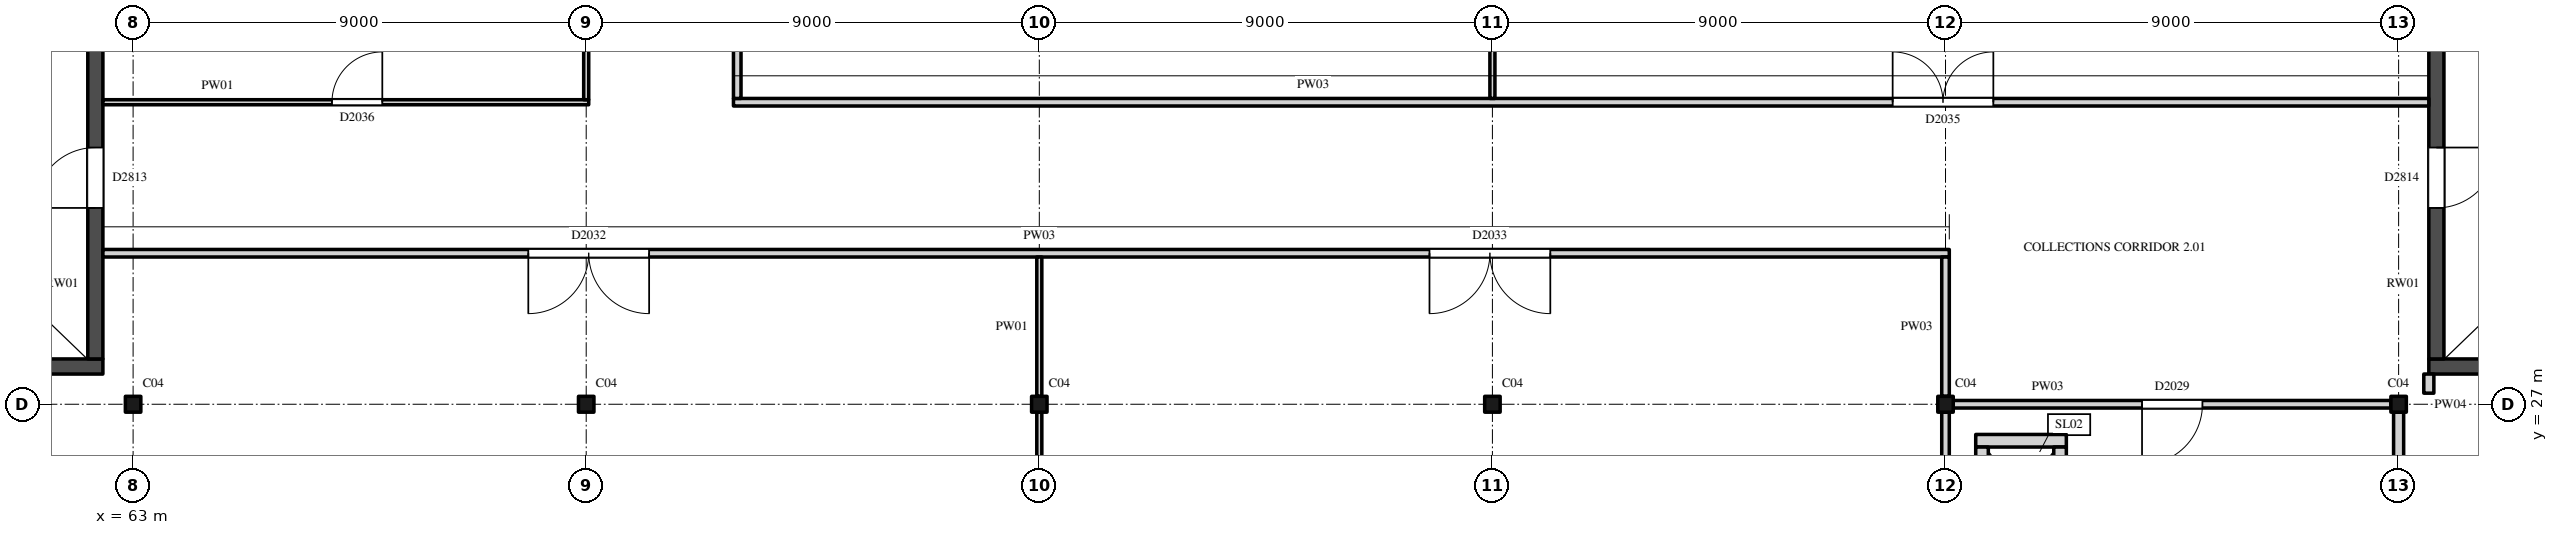
"""IFC4 building model, lengths in metres.
Left out: names, types, materials, properties, quantities, classifications, styles, units other than length and angle.
Written with IfcOpenShell. Run it as: python <this file> out.ifc"""

import sys

from ifc_helpers import new_model, si_unit, direction, frame, frame_2d, origin, origin_2d, place, context, subcontext, project, spatial, rectangle, i_section, extrude, element, fill, save


model = new_model("IFC4")
c1 = context("Model", 3, precision=1e-05, world=origin(), true_north=direction((0.0, 1.0)))
c2 = subcontext(c1, "Body", "Model", "MODEL_VIEW")
j1 = project(units=[si_unit("LENGTHUNIT", "METRE"), si_unit("PLANEANGLEUNIT", "RADIAN")], contexts=[c1])
p1 = place(None, origin())
s1 = spatial("IfcSite", under=j1, at=p1, CompositionType="ELEMENT")
p2 = place(p1, origin())
s2 = spatial("IfcBuilding", under=s1, at=p2, CompositionType="ELEMENT")
p3 = place(p2, frame((0.0, 0.0, 11.0)))
s3 = spatial("IfcBuildingStorey", under=s2, at=p3, CompositionType="ELEMENT", Elevation=11.0)
for number, where, z_axis, x_axis in (
    (1, (63.0, 27.0, 0.0), (0.0, 0.0, 1.0), (1.0, 0.0, 0.0)),
    (2, (72.0, 27.0, 0.0), (0.0, 0.0, 1.0), (1.0, 0.0, 0.0)),
    (3, (81.0, 27.0, 0.0), (0.0, 0.0, 1.0), (1.0, 0.0, 0.0)),
    (4, (90.0, 27.0, 0.0), (0.0, 0.0, 1.0), (1.0, 0.0, 0.0)),
    (5, (99.0, 27.0, 0.0), (0.0, 0.0, 1.0), (1.0, 0.0, 0.0)),
    (6, (108.0, 27.0, 0.0), (0.0, 0.0, 1.0), (1.0, 0.0, 0.0)),
):
    element("IfcColumn", number, at=place(p3, frame(where, z_axis=z_axis, x_axis=x_axis)), inside=s3, PredefinedType="COLUMN", context=c2, shape_type="SweptSolid", body=[
        extrude(i_section(OverallWidth=0.307, OverallDepth=0.315, WebThickness=0.012, FlangeThickness=0.019, FilletRadius=0.017, at=origin_2d()), origin(), (0.0, 0.0, 1.0), 5.0),
    ])
p4 = place(p3, frame((54.3, 27.75, 0.0), z_axis=(0.0, 0.0, 1.0), x_axis=(1.0, 0.0, 0.0)))
e7 = element("IfcWall", 7, at=p4, inside=s3, PredefinedType="SHEAR", context=c2, shape_type="SweptSolid", body=[
    extrude(rectangle(XDim=8.1, YDim=0.3, at=frame_2d((4.05, 0.0))), origin(), (0.0, 0.0, 1.0), 4.825),
])
p5 = place(p3, frame((62.25, 27.9, 0.0), z_axis=(0.0, 0.0, 1.0), x_axis=(0.0, 1.0, 0.0)))
e8 = element("IfcWall", 8, at=p5, inside=s3, PredefinedType="SHEAR", context=c2, shape_type="SweptSolid", body=[
    extrude(rectangle(XDim=7.2, YDim=0.3, at=frame_2d((3.6, 0.0))), origin(), (0.0, 0.0, 1.0), 4.825),
])
p6 = place(p5, frame((3.0, 0.0, 0.0)))
e9 = element("IfcOpeningElement", 9, at=p6, cuts=e8, PredefinedType="OPENING", context=c2, shape_type="SweptSolid", body=[
    extrude(rectangle(XDim=1.2, YDim=2.1, at=frame_2d((0.6, 1.05))), frame((0.0, 0.16, 0.0), z_axis=(0.0, -1.0, 0.0), x_axis=(1.0, 0.0, 0.0)), (0.0, 0.0, 1.0), 0.32),
])
p7 = place(p3, frame((108.6, 27.75, 0.0), z_axis=(0.0, 0.0, 1.0), x_axis=(1.0, 0.0, 0.0)))
e10 = element("IfcWall", 10, at=p7, inside=s3, PredefinedType="SHEAR", context=c2, shape_type="SweptSolid", body=[
    extrude(rectangle(XDim=8.1, YDim=0.3, at=frame_2d((4.05, 0.0))), origin(), (0.0, 0.0, 1.0), 4.825),
])
p8 = place(p3, frame((108.75, 27.9, 0.0), z_axis=(0.0, 0.0, 1.0), x_axis=(0.0, 1.0, 0.0)))
e11 = element("IfcWall", 11, at=p8, inside=s3, PredefinedType="SHEAR", context=c2, shape_type="SweptSolid", body=[
    extrude(rectangle(XDim=7.2, YDim=0.3, at=frame_2d((3.6, 0.0))), origin(), (0.0, 0.0, 1.0), 4.825),
])
p9 = place(p8, frame((3.0, 0.0, 0.0)))
e12 = element("IfcOpeningElement", 12, at=p9, cuts=e11, PredefinedType="OPENING", context=c2, shape_type="SweptSolid", body=[
    extrude(rectangle(XDim=1.2, YDim=2.1, at=frame_2d((0.6, 1.05))), frame((0.0, 0.16, 0.0), z_axis=(0.0, -1.0, 0.0), x_axis=(1.0, 0.0, 0.0)), (0.0, 0.0, 1.0), 0.32),
])
p10 = place(p3, frame((99.6, 26.275, 0.0), z_axis=(0.0, 0.0, 1.0), x_axis=(1.0, 0.0, 0.0)))
e13 = element("IfcWall", 13, at=p10, inside=s3, PredefinedType="STANDARD", context=c2, shape_type="SweptSolid", body=[
    extrude(rectangle(XDim=1.8, YDim=0.25, at=frame_2d((0.9, 0.0))), origin(), (0.0, 0.0, 1.0), 4.825),
])
p11 = place(p3, frame((99.725, 24.25, 0.0), z_axis=(0.0, 0.0, 1.0), x_axis=(0.0, 1.0, 0.0)))
e14 = element("IfcWall", 14, at=p11, inside=s3, PredefinedType="STANDARD", context=c2, shape_type="SweptSolid", body=[
    extrude(rectangle(XDim=1.9, YDim=0.25, at=frame_2d((0.95, 0.0))), origin(), (0.0, 0.0, 1.0), 4.825),
])
p12 = place(p3, frame((101.275, 24.25, 0.0), z_axis=(0.0, 0.0, 1.0), x_axis=(0.0, 1.0, 0.0)))
e15 = element("IfcWall", 15, at=p12, inside=s3, PredefinedType="STANDARD", context=c2, shape_type="SweptSolid", body=[
    extrude(rectangle(XDim=1.9, YDim=0.25, at=frame_2d((0.95, 0.0))), origin(), (0.0, 0.0, 1.0), 4.825),
])
p13 = place(p12, frame((0.5, 0.0, 0.0)))
e16 = element("IfcOpeningElement", 16, at=p13, cuts=e15, PredefinedType="OPENING", context=c2, shape_type="SweptSolid", body=[
    extrude(rectangle(XDim=0.9, YDim=2.1, at=frame_2d((0.45, 1.05))), frame((0.0, 0.135, 0.0), z_axis=(0.0, -1.0, 0.0), x_axis=(1.0, 0.0, 0.0)), (0.0, 0.0, 1.0), 0.27),
])
for number, where, z_axis, x_axis in (
    (17, (55.5, 29.325, 5.0), (0.0, 0.0, 1.0), (1.0, 0.0, 0.0)),
    (18, (55.5, 33.675, 5.0), (0.0, 0.0, 1.0), (1.0, 0.0, 0.0)),
):
    element("IfcWall", number, at=place(p3, frame(where, z_axis=z_axis, x_axis=x_axis)), inside=s3, PredefinedType="PARAPET", context=c2, shape_type="SweptSolid", body=[
        extrude(rectangle(XDim=6.0, YDim=0.15, at=frame_2d((3.0, 0.0))), origin(), (0.0, 0.0, 1.0), 0.5),
    ])
p14 = place(p3, frame((61.425, 29.4, 5.0), z_axis=(0.0, 0.0, 1.0), x_axis=(0.0, 1.0, 0.0)))
e19 = element("IfcWall", 19, at=p14, inside=s3, PredefinedType="PARAPET", context=c2, shape_type="SweptSolid", body=[
    extrude(rectangle(XDim=4.2, YDim=0.15, at=frame_2d((2.1, 0.0))), origin(), (0.0, 0.0, 1.0), 0.5),
])
for number, where, z_axis, x_axis in (
    (20, (64.5, 29.325, 5.0), (0.0, 0.0, 1.0), (1.0, 0.0, 0.0)),
    (21, (64.5, 33.675, 5.0), (0.0, 0.0, 1.0), (1.0, 0.0, 0.0)),
):
    element("IfcWall", number, at=place(p3, frame(where, z_axis=z_axis, x_axis=x_axis)), inside=s3, PredefinedType="PARAPET", context=c2, shape_type="SweptSolid", body=[
        extrude(rectangle(XDim=6.0, YDim=0.15, at=frame_2d((3.0, 0.0))), origin(), (0.0, 0.0, 1.0), 0.5),
    ])
for number, where, z_axis, x_axis in (
    (22, (64.575, 29.4, 5.0), (0.0, 0.0, 1.0), (0.0, 1.0, 0.0)),
    (23, (70.425, 29.4, 5.0), (0.0, 0.0, 1.0), (0.0, 1.0, 0.0)),
):
    element("IfcWall", number, at=place(p3, frame(where, z_axis=z_axis, x_axis=x_axis)), inside=s3, PredefinedType="PARAPET", context=c2, shape_type="SweptSolid", body=[
        extrude(rectangle(XDim=4.2, YDim=0.15, at=frame_2d((2.1, 0.0))), origin(), (0.0, 0.0, 1.0), 0.5),
    ])
for number, where, z_axis, x_axis in (
    (24, (73.5, 29.325, 5.0), (0.0, 0.0, 1.0), (1.0, 0.0, 0.0)),
    (25, (73.5, 33.675, 5.0), (0.0, 0.0, 1.0), (1.0, 0.0, 0.0)),
):
    element("IfcWall", number, at=place(p3, frame(where, z_axis=z_axis, x_axis=x_axis)), inside=s3, PredefinedType="PARAPET", context=c2, shape_type="SweptSolid", body=[
        extrude(rectangle(XDim=6.0, YDim=0.15, at=frame_2d((3.0, 0.0))), origin(), (0.0, 0.0, 1.0), 0.5),
    ])
for number, where, z_axis, x_axis in (
    (26, (73.575, 29.4, 5.0), (0.0, 0.0, 1.0), (0.0, 1.0, 0.0)),
    (27, (79.425, 29.4, 5.0), (0.0, 0.0, 1.0), (0.0, 1.0, 0.0)),
):
    element("IfcWall", number, at=place(p3, frame(where, z_axis=z_axis, x_axis=x_axis)), inside=s3, PredefinedType="PARAPET", context=c2, shape_type="SweptSolid", body=[
        extrude(rectangle(XDim=4.2, YDim=0.15, at=frame_2d((2.1, 0.0))), origin(), (0.0, 0.0, 1.0), 0.5),
    ])
for number, where, z_axis, x_axis in (
    (28, (82.5, 29.325, 5.0), (0.0, 0.0, 1.0), (1.0, 0.0, 0.0)),
    (29, (82.5, 33.675, 5.0), (0.0, 0.0, 1.0), (1.0, 0.0, 0.0)),
):
    element("IfcWall", number, at=place(p3, frame(where, z_axis=z_axis, x_axis=x_axis)), inside=s3, PredefinedType="PARAPET", context=c2, shape_type="SweptSolid", body=[
        extrude(rectangle(XDim=6.0, YDim=0.15, at=frame_2d((3.0, 0.0))), origin(), (0.0, 0.0, 1.0), 0.5),
    ])
for number, where, z_axis, x_axis in (
    (30, (82.575, 29.4, 5.0), (0.0, 0.0, 1.0), (0.0, 1.0, 0.0)),
    (31, (88.425, 29.4, 5.0), (0.0, 0.0, 1.0), (0.0, 1.0, 0.0)),
):
    element("IfcWall", number, at=place(p3, frame(where, z_axis=z_axis, x_axis=x_axis)), inside=s3, PredefinedType="PARAPET", context=c2, shape_type="SweptSolid", body=[
        extrude(rectangle(XDim=4.2, YDim=0.15, at=frame_2d((2.1, 0.0))), origin(), (0.0, 0.0, 1.0), 0.5),
    ])
for number, where, z_axis, x_axis in (
    (32, (91.5, 29.325, 5.0), (0.0, 0.0, 1.0), (1.0, 0.0, 0.0)),
    (33, (91.5, 33.675, 5.0), (0.0, 0.0, 1.0), (1.0, 0.0, 0.0)),
):
    element("IfcWall", number, at=place(p3, frame(where, z_axis=z_axis, x_axis=x_axis)), inside=s3, PredefinedType="PARAPET", context=c2, shape_type="SweptSolid", body=[
        extrude(rectangle(XDim=6.0, YDim=0.15, at=frame_2d((3.0, 0.0))), origin(), (0.0, 0.0, 1.0), 0.5),
    ])
for number, where, z_axis, x_axis in (
    (34, (91.575, 29.4, 5.0), (0.0, 0.0, 1.0), (0.0, 1.0, 0.0)),
    (35, (97.425, 29.4, 5.0), (0.0, 0.0, 1.0), (0.0, 1.0, 0.0)),
):
    element("IfcWall", number, at=place(p3, frame(where, z_axis=z_axis, x_axis=x_axis)), inside=s3, PredefinedType="PARAPET", context=c2, shape_type="SweptSolid", body=[
        extrude(rectangle(XDim=4.2, YDim=0.15, at=frame_2d((2.1, 0.0))), origin(), (0.0, 0.0, 1.0), 0.5),
    ])
for number, where, z_axis, x_axis in (
    (36, (100.5, 29.325, 5.0), (0.0, 0.0, 1.0), (1.0, 0.0, 0.0)),
    (37, (100.5, 33.675, 5.0), (0.0, 0.0, 1.0), (1.0, 0.0, 0.0)),
):
    element("IfcWall", number, at=place(p3, frame(where, z_axis=z_axis, x_axis=x_axis)), inside=s3, PredefinedType="PARAPET", context=c2, shape_type="SweptSolid", body=[
        extrude(rectangle(XDim=6.0, YDim=0.15, at=frame_2d((3.0, 0.0))), origin(), (0.0, 0.0, 1.0), 0.5),
    ])
for number, where, z_axis, x_axis in (
    (38, (100.575, 29.4, 5.0), (0.0, 0.0, 1.0), (0.0, 1.0, 0.0)),
    (39, (106.425, 29.4, 5.0), (0.0, 0.0, 1.0), (0.0, 1.0, 0.0)),
):
    element("IfcWall", number, at=place(p3, frame(where, z_axis=z_axis, x_axis=x_axis)), inside=s3, PredefinedType="PARAPET", context=c2, shape_type="SweptSolid", body=[
        extrude(rectangle(XDim=4.2, YDim=0.15, at=frame_2d((2.1, 0.0))), origin(), (0.0, 0.0, 1.0), 0.5),
    ])
for number, where, z_axis, x_axis in (
    (40, (109.5, 29.325, 5.0), (0.0, 0.0, 1.0), (1.0, 0.0, 0.0)),
    (41, (109.5, 33.675, 5.0), (0.0, 0.0, 1.0), (1.0, 0.0, 0.0)),
):
    element("IfcWall", number, at=place(p3, frame(where, z_axis=z_axis, x_axis=x_axis)), inside=s3, PredefinedType="PARAPET", context=c2, shape_type="SweptSolid", body=[
        extrude(rectangle(XDim=6.0, YDim=0.15, at=frame_2d((3.0, 0.0))), origin(), (0.0, 0.0, 1.0), 0.5),
    ])
p15 = place(p3, frame((109.575, 29.4, 5.0), z_axis=(0.0, 0.0, 1.0), x_axis=(0.0, 1.0, 0.0)))
e42 = element("IfcWall", 42, at=p15, inside=s3, PredefinedType="PARAPET", context=c2, shape_type="SweptSolid", body=[
    extrude(rectangle(XDim=4.2, YDim=0.15, at=frame_2d((2.1, 0.0))), origin(), (0.0, 0.0, 1.0), 0.5),
])
p16 = place(p3, frame((99.154, 27.0, 0.0), z_axis=(0.0, 0.0, 1.0), x_axis=(1.0, 0.0, 0.0)))
e43 = element("IfcWall", 43, at=p16, inside=s3, PredefinedType="PARTITIONING", context=c2, shape_type="SweptSolid", body=[
    extrude(rectangle(XDim=8.693, YDim=0.15, at=frame_2d((4.346, 0.0))), origin(), (0.0, 0.0, 1.0), 4.419),
])
p17 = place(p16, frame((3.75, 0.0, 0.0)))
e44 = element("IfcOpeningElement", 44, at=p17, cuts=e43, PredefinedType="OPENING", context=c2, shape_type="SweptSolid", body=[
    extrude(rectangle(XDim=1.2, YDim=2.4, at=frame_2d((0.6, 1.2))), frame((0.0, 0.085, 0.0), z_axis=(0.0, -1.0, 0.0), x_axis=(1.0, 0.0, 0.0)), (0.0, 0.0, 1.0), 0.17),
])
p18 = place(p3, frame((62.4, 30.0, 0.0), z_axis=(0.0, 0.0, 1.0), x_axis=(1.0, 0.0, 0.0)))
e45 = element("IfcWall", 45, at=p18, inside=s3, PredefinedType="PARTITIONING", context=c2, shape_type="SweptSolid", body=[
    extrude(rectangle(XDim=36.675, YDim=0.15, at=frame_2d((18.337, 0.0))), origin(), (0.0, 0.0, 1.0), 4.422),
])
p19 = place(p18, frame((8.45, 0.0, 0.0)))
e46 = element("IfcOpeningElement", 46, at=p19, cuts=e45, PredefinedType="OPENING", context=c2, shape_type="SweptSolid", body=[
    extrude(rectangle(XDim=2.4, YDim=3.0, at=frame_2d((1.2, 1.5))), frame((0.0, 0.085, 0.0), z_axis=(0.0, -1.0, 0.0), x_axis=(1.0, 0.0, 0.0)), (0.0, 0.0, 1.0), 0.17),
])
p20 = place(p18, frame((26.35, 0.0, 0.0)))
e47 = element("IfcOpeningElement", 47, at=p20, cuts=e45, PredefinedType="OPENING", context=c2, shape_type="SweptSolid", body=[
    extrude(rectangle(XDim=2.4, YDim=3.0, at=frame_2d((1.2, 1.5))), frame((0.0, 0.085, 0.0), z_axis=(0.0, -1.0, 0.0), x_axis=(1.0, 0.0, 0.0)), (0.0, 0.0, 1.0), 0.17),
])
p21 = place(p3, frame((62.4, 33.0, 0.0), z_axis=(0.0, 0.0, 1.0), x_axis=(1.0, 0.0, 0.0)))
e48 = element("IfcWall", 48, at=p21, inside=s3, PredefinedType="PARTITIONING", context=c2, shape_type="SweptSolid", body=[
    extrude(rectangle(XDim=9.65, YDim=0.1, at=frame_2d((4.825, 0.0))), origin(), (0.0, 0.0, 1.0), 4.422),
])
p22 = place(p21, frame((4.55, 0.0, 0.0)))
e49 = element("IfcOpeningElement", 49, at=p22, cuts=e48, PredefinedType="OPENING", context=c2, shape_type="SweptSolid", body=[
    extrude(rectangle(XDim=1.0, YDim=2.1, at=frame_2d((0.5, 1.05))), frame((0.0, 0.06, 0.0), z_axis=(0.0, -1.0, 0.0), x_axis=(1.0, 0.0, 0.0)), (0.0, 0.0, 1.0), 0.12),
])
p23 = place(p3, frame((74.925, 33.0, 0.0), z_axis=(0.0, 0.0, 1.0), x_axis=(1.0, 0.0, 0.0)))
e50 = element("IfcWall", 50, at=p23, inside=s3, PredefinedType="PARTITIONING", context=c2, shape_type="SweptSolid", body=[
    extrude(rectangle(XDim=33.675, YDim=0.15, at=frame_2d((16.837, 0.0))), origin(), (0.0, 0.0, 1.0), 4.422),
])
p24 = place(p23, frame((23.025, 0.0, 0.0)))
e51 = element("IfcOpeningElement", 51, at=p24, cuts=e50, PredefinedType="OPENING", context=c2, shape_type="SweptSolid", body=[
    extrude(rectangle(XDim=2.0, YDim=2.4, at=frame_2d((1.0, 1.2))), frame((0.0, 0.085, 0.0), z_axis=(0.0, -1.0, 0.0), x_axis=(1.0, 0.0, 0.0)), (0.0, 0.0, 1.0), 0.17),
])
p25 = place(p3, frame((72.0, 33.05, 0.0), z_axis=(0.0, 0.0, 1.0), x_axis=(0.0, 1.0, 0.0)))
e52 = element("IfcWall", 52, at=p25, inside=s3, PredefinedType="PARTITIONING", context=c2, shape_type="SweptSolid", body=[
    extrude(rectangle(XDim=2.793, YDim=0.1, at=frame_2d((1.396, 0.0))), origin(), (0.0, 0.0, 1.0), 4.297),
])
p26 = place(p3, frame((75.0, 33.075, 0.0), z_axis=(0.0, 0.0, 1.0), x_axis=(0.0, 1.0, 0.0)))
e53 = element("IfcWall", 53, at=p26, inside=s3, PredefinedType="PARTITIONING", context=c2, shape_type="SweptSolid", body=[
    extrude(rectangle(XDim=5.85, YDim=0.15, at=frame_2d((2.925, 0.0))), origin(), (0.0, 0.0, 1.0), 4.825),
])
p27 = place(p3, frame((81.0, 18.157, 0.0), z_axis=(0.0, 0.0, 1.0), x_axis=(0.0, 1.0, 0.0)))
e54 = element("IfcWall", 54, at=p27, inside=s3, PredefinedType="PARTITIONING", context=c2, shape_type="SweptSolid", body=[
    extrude(rectangle(XDim=8.686, YDim=0.1, at=frame_2d((4.343, 0.0))), origin(), (0.0, 0.0, 1.0), 4.297),
])
for number, where, z_axis, x_axis in (
    (55, (81.0, 27.157, 0.0), (0.0, 0.0, 1.0), (0.0, 1.0, 0.0)),
    (56, (90.0, 33.075, 0.0), (0.0, 0.0, 1.0), (0.0, 1.0, 0.0)),
):
    element("IfcWall", number, at=place(p3, frame(where, z_axis=z_axis, x_axis=x_axis)), inside=s3, PredefinedType="PARTITIONING", context=c2, shape_type="SweptSolid", body=[
        extrude(rectangle(XDim=2.768, YDim=0.1, at=frame_2d((1.384, 0.0))), origin(), (0.0, 0.0, 1.0), 4.297),
    ])
p28 = place(p3, frame((99.0, 18.157, 0.0), z_axis=(0.0, 0.0, 1.0), x_axis=(0.0, 1.0, 0.0)))
e57 = element("IfcWall", 57, at=p28, inside=s3, PredefinedType="PARTITIONING", context=c2, shape_type="SweptSolid", body=[
    extrude(rectangle(XDim=8.686, YDim=0.15, at=frame_2d((4.343, 0.0))), origin(), (0.0, 0.0, 1.0), 4.297),
])
p29 = place(p3, frame((99.0, 27.157, 0.0), z_axis=(0.0, 0.0, 1.0), x_axis=(0.0, 1.0, 0.0)))
e58 = element("IfcWall", 58, at=p29, inside=s3, PredefinedType="PARTITIONING", context=c2, shape_type="SweptSolid", body=[
    extrude(rectangle(XDim=2.768, YDim=0.15, at=frame_2d((1.384, 0.0))), origin(), (0.0, 0.0, 1.0), 4.297),
])
p30 = place(p3, frame((108.0, 18.157, 0.0), z_axis=(0.0, 0.0, 1.0), x_axis=(0.0, 1.0, 0.0)))
e59 = element("IfcWall", 59, at=p30, inside=s3, PredefinedType="PARTITIONING", context=c2, shape_type="SweptSolid", body=[
    extrude(rectangle(XDim=8.686, YDim=0.2, at=frame_2d((4.343, 0.0))), origin(), (0.0, 0.0, 1.0), 4.297),
])
p31 = place(p3, frame((108.6, 27.22, 0.0), z_axis=(0.0, 0.0, 1.0), x_axis=(0.0, 1.0, 0.0)))
e60 = element("IfcWall", 60, at=p31, inside=s3, PredefinedType="PARTITIONING", context=c2, shape_type="SweptSolid", body=[
    extrude(rectangle(XDim=0.38, YDim=0.2, at=frame_2d((0.19, 0.0))), origin(), (0.0, 0.0, 1.0), 4.825),
])
p32 = place(p6, origin())
e61 = element("IfcDoor", 61, at=p32, inside=s3, OperationType="SINGLE_SWING_RIGHT", PredefinedType="DOOR", context=c2, shape_type="SweptSolid", body=[
    extrude(rectangle(XDim=1.2, YDim=2.1, at=frame_2d((0.6, 1.05))), frame((0.0, 0.025, 0.0), z_axis=(0.0, -1.0, 0.0), x_axis=(1.0, 0.0, 0.0)), (0.0, 0.0, 1.0), 0.05),
])
fill(e9, e61)
p33 = place(p9, origin())
e62 = element("IfcDoor", 62, at=p33, inside=s3, OperationType="SINGLE_SWING_RIGHT", PredefinedType="DOOR", context=c2, shape_type="SweptSolid", body=[
    extrude(rectangle(XDim=1.2, YDim=2.1, at=frame_2d((0.6, 1.05))), frame((0.0, 0.025, 0.0), z_axis=(0.0, -1.0, 0.0), x_axis=(1.0, 0.0, 0.0)), (0.0, 0.0, 1.0), 0.05),
])
fill(e12, e62)
p34 = place(p17, origin())
e63 = element("IfcDoor", 63, at=p34, inside=s3, OperationType="SINGLE_SWING_LEFT", PredefinedType="DOOR", context=c2, shape_type="SweptSolid", body=[
    extrude(rectangle(XDim=1.2, YDim=2.4, at=frame_2d((0.6, 1.2))), frame((0.0, 0.025, 0.0), z_axis=(0.0, -1.0, 0.0), x_axis=(1.0, 0.0, 0.0)), (0.0, 0.0, 1.0), 0.05),
])
fill(e44, e63)
p35 = place(p19, origin())
e64 = element("IfcDoor", 64, at=p35, inside=s3, OperationType="DOUBLE_DOOR_SINGLE_SWING", PredefinedType="DOOR", context=c2, shape_type="SweptSolid", body=[
    extrude(rectangle(XDim=2.4, YDim=3.0, at=frame_2d((1.2, 1.5))), frame((0.0, 0.025, 0.0), z_axis=(0.0, -1.0, 0.0), x_axis=(1.0, 0.0, 0.0)), (0.0, 0.0, 1.0), 0.05),
])
fill(e46, e64)
p36 = place(p20, origin())
e65 = element("IfcDoor", 65, at=p36, inside=s3, OperationType="DOUBLE_DOOR_SINGLE_SWING", PredefinedType="DOOR", context=c2, shape_type="SweptSolid", body=[
    extrude(rectangle(XDim=2.4, YDim=3.0, at=frame_2d((1.2, 1.5))), frame((0.0, 0.025, 0.0), z_axis=(0.0, -1.0, 0.0), x_axis=(1.0, 0.0, 0.0)), (0.0, 0.0, 1.0), 0.05),
])
fill(e47, e65)
p37 = place(p24, origin())
e66 = element("IfcDoor", 66, at=p37, inside=s3, OperationType="DOUBLE_DOOR_SINGLE_SWING", PredefinedType="DOOR", context=c2, shape_type="SweptSolid", body=[
    extrude(rectangle(XDim=2.0, YDim=2.4, at=frame_2d((1.0, 1.2))), frame((0.0, 0.025, 0.0), z_axis=(0.0, -1.0, 0.0), x_axis=(1.0, 0.0, 0.0)), (0.0, 0.0, 1.0), 0.05),
])
fill(e51, e66)
p38 = place(p22, origin())
e67 = element("IfcDoor", 67, at=p38, inside=s3, OperationType="SINGLE_SWING_LEFT", PredefinedType="DOOR", context=c2, shape_type="SweptSolid", body=[
    extrude(rectangle(XDim=1.0, YDim=2.1, at=frame_2d((0.5, 1.05))), frame((0.0, 0.025, 0.0), z_axis=(0.0, -1.0, 0.0), x_axis=(1.0, 0.0, 0.0)), (0.0, 0.0, 1.0), 0.05),
])
fill(e49, e67)
save(model, sys.argv[1])
